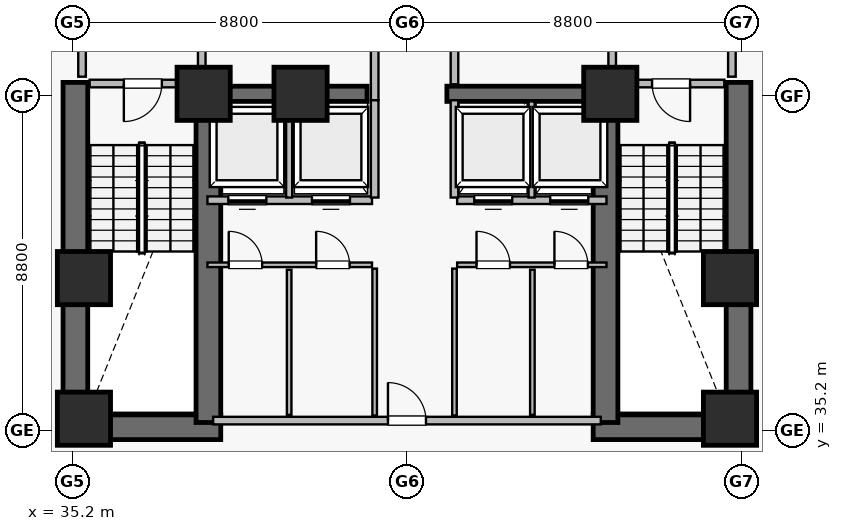
"""IFC4 building model, lengths in metres.
Left out: names, types, materials, properties, quantities, classifications, styles, units other than length and angle.
Written with IfcOpenShell. Run it as: python <this file> out.ifc"""

import sys

from ifc_helpers import new_model, si_unit, direction, frame, frame_2d, origin, origin_2d, place, context, subcontext, project, spatial, rectangle, extrude, element, fill, save


model = new_model("IFC4")
c1 = context("Model", 3, precision=1e-05, world=origin(), true_north=direction((0.0, 1.0)))
c2 = subcontext(c1, "Body", "Model", "MODEL_VIEW")
j1 = project(units=[si_unit("LENGTHUNIT", "METRE"), si_unit("PLANEANGLEUNIT", "RADIAN")], contexts=[c1])
p1 = place(None, origin())
s1 = spatial("IfcSite", under=j1, at=p1, CompositionType="ELEMENT")
p2 = place(p1, origin())
s2 = spatial("IfcBuilding", under=s1, at=p2, CompositionType="ELEMENT")
p3 = place(p2, frame((0.0, 0.0, -7.8)))
s3 = spatial("IfcBuildingStorey", under=s2, at=p3, CompositionType="ELEMENT", Elevation=-7.8)
for number, where, z_axis, x_axis in (
    (1, (34.95, 35.275, 0.0), (0.0, 0.0, 1.0), (1.0, 0.0, 0.0)),
    (2, (48.9, 35.275, 0.0), (0.0, 0.0, 1.0), (1.0, 0.0, 0.0)),
):
    element("IfcWall", number, at=place(p3, frame(where, z_axis=z_axis, x_axis=x_axis)), inside=s3, PredefinedType="SHEAR", context=c2, shape_type="SweptSolid", body=[
        extrude(rectangle(XDim=4.15, YDim=0.65, at=frame_2d((2.075, 0.0))), origin(), (0.0, 0.0, 1.0), 3.58),
    ])
for number, where, z_axis, x_axis in (
    (3, (35.275, 34.95, 0.0), (0.0, 0.0, 1.0), (0.0, 1.0, 0.0)),
    (4, (52.725, 34.95, 0.0), (0.0, 0.0, 1.0), (0.0, 1.0, 0.0)),
):
    element("IfcWall", number, at=place(p3, frame(where, z_axis=z_axis, x_axis=x_axis)), inside=s3, PredefinedType="SHEAR", context=c2, shape_type="SweptSolid", body=[
        extrude(rectangle(XDim=9.4, YDim=0.65, at=frame_2d((4.7, 0.0))), origin(), (0.0, 0.0, 1.0), 3.58),
    ])
for number, where, z_axis, x_axis in (
    (5, (38.775, 35.4, 0.0), (0.0, 0.0, 1.0), (0.0, 1.0, 0.0)),
    (6, (49.225, 35.4, 0.0), (0.0, 0.0, 1.0), (0.0, 1.0, 0.0)),
):
    element("IfcWall", number, at=place(p3, frame(where, z_axis=z_axis, x_axis=x_axis)), inside=s3, PredefinedType="SHEAR", context=c2, shape_type="SweptSolid", body=[
        extrude(rectangle(XDim=8.95, YDim=0.65, at=frame_2d((4.475, 0.0))), origin(), (0.0, 0.0, 1.0), 3.58),
    ])
for number, where, z_axis, x_axis in (
    (7, (38.75, 44.05, 0.0), (0.0, 0.0, 1.0), (1.0, 0.0, 0.0)),
    (8, (45.05, 44.05, 0.0), (0.0, 0.0, 1.0), (1.0, 0.0, 0.0)),
):
    element("IfcWall", number, at=place(p3, frame(where, z_axis=z_axis, x_axis=x_axis)), inside=s3, PredefinedType="SHEAR", context=c2, shape_type="SweptSolid", body=[
        extrude(rectangle(XDim=4.2, YDim=0.4, at=frame_2d((2.1, 0.0))), origin(), (0.0, 0.0, 1.0), 3.58),
    ])
for number, where, z_axis, x_axis in (
    (9, (35.5, 35.5, 0.0), (0.0, 0.0, 1.0), (1.0, 0.0, 0.0)),
    (10, (38.65, 44.05, 0.0), (0.0, 0.0, 1.0), (1.0, 0.0, 0.0)),
    (11, (52.5, 35.5, 0.0), (0.0, 0.0, 1.0), (1.0, 0.0, 0.0)),
    (12, (52.5, 39.2, 0.0), (0.0, 0.0, 1.0), (1.0, 0.0, 0.0)),
    (13, (49.35, 44.05, 0.0), (0.0, 0.0, 1.0), (1.0, 0.0, 0.0)),
    (14, (35.5, 39.2, 0.0), (0.0, 0.0, 1.0), (1.0, 0.0, 0.0)),
    (15, (41.2, 44.05, 0.0), (0.0, 0.0, 1.0), (1.0, 0.0, 0.0)),
):
    element("IfcColumn", number, at=place(p3, frame(where, z_axis=z_axis, x_axis=x_axis)), inside=s3, PredefinedType="COLUMN", context=c2, shape_type="SweptSolid", body=[
        extrude(rectangle(XDim=1.4, YDim=1.4, at=origin_2d()), origin(), (0.0, 0.0, 1.0), 3.9),
    ])
p4 = place(p3, frame((38.9, 35.45, 0.0), z_axis=(0.0, 0.0, 1.0), x_axis=(1.0, 0.0, 0.0)))
e16 = element("IfcWall", 16, at=p4, inside=s3, PredefinedType="SOLIDWALL", context=c2, shape_type="SweptSolid", body=[
    extrude(rectangle(XDim=10.2, YDim=0.2, at=frame_2d((5.1, 0.0))), origin(), (0.0, 0.0, 1.0), 3.58),
])
p5 = place(p4, frame((4.6, 0.0, 0.0)))
e17 = element("IfcOpeningElement", 17, at=p5, cuts=e16, PredefinedType="OPENING", context=c2, shape_type="SweptSolid", body=[
    extrude(rectangle(XDim=1.0, YDim=2.15, at=frame_2d((0.5, 1.075))), frame((0.0, 0.11, 0.0), z_axis=(0.0, -1.0, 0.0), x_axis=(1.0, 0.0, 0.0)), (0.0, 0.0, 1.0), 0.22),
])
p6 = place(p3, frame((35.45, 44.5, 0.0), z_axis=(0.0, 0.0, 1.0), x_axis=(0.0, 1.0, 0.0)))
e18 = element("IfcWall", 18, at=p6, inside=s3, PredefinedType="SOLIDWALL", context=c2, shape_type="SweptSolid", body=[
    extrude(rectangle(XDim=7.92, YDim=0.2, at=frame_2d((3.96, 0.0))), origin(), (0.0, 0.0, 1.0), 3.58),
])
p7 = place(p6, frame((2.6, 0.0, 0.0)))
e19 = element("IfcOpeningElement", 19, at=p7, cuts=e18, PredefinedType="OPENING", context=c2, shape_type="SweptSolid", body=[
    extrude(rectangle(XDim=1.0, YDim=2.15, at=frame_2d((0.5, 1.075))), frame((0.0, 0.11, 0.0), z_axis=(0.0, -1.0, 0.0), x_axis=(1.0, 0.0, 0.0)), (0.0, 0.0, 1.0), 0.22),
])
p8 = place(p3, frame((52.55, 44.5, 0.0), z_axis=(0.0, 0.0, 1.0), x_axis=(0.0, 1.0, 0.0)))
e20 = element("IfcWall", 20, at=p8, inside=s3, PredefinedType="SOLIDWALL", context=c2, shape_type="SweptSolid", body=[
    extrude(rectangle(XDim=7.92, YDim=0.2, at=frame_2d((3.96, 0.0))), origin(), (0.0, 0.0, 1.0), 3.58),
])
p9 = place(p8, frame((2.6, 0.0, 0.0)))
e21 = element("IfcOpeningElement", 21, at=p9, cuts=e20, PredefinedType="OPENING", context=c2, shape_type="SweptSolid", body=[
    extrude(rectangle(XDim=1.0, YDim=2.15, at=frame_2d((0.5, 1.075))), frame((0.0, 0.11, 0.0), z_axis=(0.0, -1.0, 0.0), x_axis=(1.0, 0.0, 0.0)), (0.0, 0.0, 1.0), 0.22),
])
p10 = place(p3, frame((38.6, 44.5, 0.0), z_axis=(0.0, 0.0, 1.0), x_axis=(0.0, 1.0, 0.0)))
e22 = element("IfcWall", 22, at=p10, inside=s3, PredefinedType="SOLIDWALL", context=c2, shape_type="SweptSolid", body=[
    extrude(rectangle(XDim=7.92, YDim=0.2, at=frame_2d((3.96, 0.0))), origin(), (0.0, 0.0, 1.0), 3.58),
])
p11 = place(p10, frame((3.425, 0.0, 0.0)))
e23 = element("IfcOpeningElement", 23, at=p11, cuts=e22, PredefinedType="OPENING", context=c2, shape_type="SweptSolid", body=[
    extrude(rectangle(XDim=0.95, YDim=2.15, at=frame_2d((0.475, 1.075))), frame((0.0, 0.11, 0.0), z_axis=(0.0, -1.0, 0.0), x_axis=(1.0, 0.0, 0.0)), (0.0, 0.0, 1.0), 0.22),
])
p12 = place(p3, frame((49.4, 44.5, 0.0), z_axis=(0.0, 0.0, 1.0), x_axis=(0.0, 1.0, 0.0)))
e24 = element("IfcWall", 24, at=p12, inside=s3, PredefinedType="SOLIDWALL", context=c2, shape_type="SweptSolid", body=[
    extrude(rectangle(XDim=7.92, YDim=0.2, at=frame_2d((3.96, 0.0))), origin(), (0.0, 0.0, 1.0), 3.58),
])
p13 = place(p12, frame((3.425, 0.0, 0.0)))
e25 = element("IfcOpeningElement", 25, at=p13, cuts=e24, PredefinedType="OPENING", context=c2, shape_type="SweptSolid", body=[
    extrude(rectangle(XDim=0.95, YDim=2.15, at=frame_2d((0.475, 1.075))), frame((0.0, 0.11, 0.0), z_axis=(0.0, -1.0, 0.0), x_axis=(1.0, 0.0, 0.0)), (0.0, 0.0, 1.0), 0.22),
])
p14 = place(p3, frame((38.75, 41.25, 0.0), z_axis=(0.0, 0.0, 1.0), x_axis=(1.0, 0.0, 0.0)))
e26 = element("IfcWall", 26, at=p14, inside=s3, PredefinedType="SOLIDWALL", context=c2, shape_type="SweptSolid", body=[
    extrude(rectangle(XDim=4.33, YDim=0.2, at=frame_2d((2.165, 0.0))), origin(), (0.0, 0.0, 1.0), 3.58),
])
p15 = place(p14, frame((0.55, 0.0, 0.0)))
e27 = element("IfcOpeningElement", 27, at=p15, cuts=e26, PredefinedType="OPENING", context=c2, shape_type="SweptSolid", body=[
    extrude(rectangle(XDim=1.0, YDim=2.15, at=frame_2d((0.5, 1.075))), frame((0.0, 0.11, 0.0), z_axis=(0.0, -1.0, 0.0), x_axis=(1.0, 0.0, 0.0)), (0.0, 0.0, 1.0), 0.22),
])
p16 = place(p14, frame((2.75, 0.0, 0.0)))
e28 = element("IfcOpeningElement", 28, at=p16, cuts=e26, PredefinedType="OPENING", context=c2, shape_type="SweptSolid", body=[
    extrude(rectangle(XDim=1.0, YDim=2.15, at=frame_2d((0.5, 1.075))), frame((0.0, 0.11, 0.0), z_axis=(0.0, -1.0, 0.0), x_axis=(1.0, 0.0, 0.0)), (0.0, 0.0, 1.0), 0.22),
])
p17 = place(p3, frame((38.75, 39.55, 0.0), z_axis=(0.0, 0.0, 1.0), x_axis=(1.0, 0.0, 0.0)))
e29 = element("IfcWall", 29, at=p17, inside=s3, PredefinedType="PARTITIONING", context=c2, shape_type="SweptSolid", body=[
    extrude(rectangle(XDim=4.33, YDim=0.12, at=frame_2d((2.165, 0.0))), origin(), (0.0, 0.0, 1.0), 3.58),
])
p18 = place(p17, frame((0.56, 0.0, 0.0)))
e30 = element("IfcOpeningElement", 30, at=p18, cuts=e29, PredefinedType="OPENING", context=c2, shape_type="SweptSolid", body=[
    extrude(rectangle(XDim=0.88, YDim=2.1, at=frame_2d((0.44, 1.05))), frame((0.0, 0.07, 0.0), z_axis=(0.0, -1.0, 0.0), x_axis=(1.0, 0.0, 0.0)), (0.0, 0.0, 1.0), 0.14),
])
p19 = place(p17, frame((2.86, 0.0, 0.0)))
e31 = element("IfcOpeningElement", 31, at=p19, cuts=e29, PredefinedType="OPENING", context=c2, shape_type="SweptSolid", body=[
    extrude(rectangle(XDim=0.88, YDim=2.1, at=frame_2d((0.44, 1.05))), frame((0.0, 0.07, 0.0), z_axis=(0.0, -1.0, 0.0), x_axis=(1.0, 0.0, 0.0)), (0.0, 0.0, 1.0), 0.14),
])
p20 = place(p3, frame((45.32, 41.25, 0.0), z_axis=(0.0, 0.0, 1.0), x_axis=(1.0, 0.0, 0.0)))
e32 = element("IfcWall", 32, at=p20, inside=s3, PredefinedType="SOLIDWALL", context=c2, shape_type="SweptSolid", body=[
    extrude(rectangle(XDim=3.93, YDim=0.2, at=frame_2d((1.965, 0.0))), origin(), (0.0, 0.0, 1.0), 3.58),
])
p21 = place(p20, frame((0.45, 0.0, 0.0)))
e33 = element("IfcOpeningElement", 33, at=p21, cuts=e32, PredefinedType="OPENING", context=c2, shape_type="SweptSolid", body=[
    extrude(rectangle(XDim=1.0, YDim=2.15, at=frame_2d((0.5, 1.075))), frame((0.0, 0.11, 0.0), z_axis=(0.0, -1.0, 0.0), x_axis=(1.0, 0.0, 0.0)), (0.0, 0.0, 1.0), 0.22),
])
p22 = place(p20, frame((2.45, 0.0, 0.0)))
e34 = element("IfcOpeningElement", 34, at=p22, cuts=e32, PredefinedType="OPENING", context=c2, shape_type="SweptSolid", body=[
    extrude(rectangle(XDim=1.0, YDim=2.15, at=frame_2d((0.5, 1.075))), frame((0.0, 0.11, 0.0), z_axis=(0.0, -1.0, 0.0), x_axis=(1.0, 0.0, 0.0)), (0.0, 0.0, 1.0), 0.22),
])
p23 = place(p3, frame((45.32, 39.55, 0.0), z_axis=(0.0, 0.0, 1.0), x_axis=(1.0, 0.0, 0.0)))
e35 = element("IfcWall", 35, at=p23, inside=s3, PredefinedType="PARTITIONING", context=c2, shape_type="SweptSolid", body=[
    extrude(rectangle(XDim=3.93, YDim=0.12, at=frame_2d((1.965, 0.0))), origin(), (0.0, 0.0, 1.0), 3.58),
])
p24 = place(p23, frame((0.51, 0.0, 0.0)))
e36 = element("IfcOpeningElement", 36, at=p24, cuts=e35, PredefinedType="OPENING", context=c2, shape_type="SweptSolid", body=[
    extrude(rectangle(XDim=0.88, YDim=2.1, at=frame_2d((0.44, 1.05))), frame((0.0, 0.07, 0.0), z_axis=(0.0, -1.0, 0.0), x_axis=(1.0, 0.0, 0.0)), (0.0, 0.0, 1.0), 0.14),
])
p25 = place(p23, frame((2.56, 0.0, 0.0)))
e37 = element("IfcOpeningElement", 37, at=p25, cuts=e35, PredefinedType="OPENING", context=c2, shape_type="SweptSolid", body=[
    extrude(rectangle(XDim=0.88, YDim=2.1, at=frame_2d((0.44, 1.05))), frame((0.0, 0.07, 0.0), z_axis=(0.0, -1.0, 0.0), x_axis=(1.0, 0.0, 0.0)), (0.0, 0.0, 1.0), 0.14),
])
p26 = place(p3, frame((35.65, 44.32, 0.0), z_axis=(0.0, 0.0, 1.0), x_axis=(1.0, 0.0, 0.0)))
e38 = element("IfcWall", 38, at=p26, inside=s3, PredefinedType="SOLIDWALL", context=c2, shape_type="SweptSolid", body=[
    extrude(rectangle(XDim=2.8, YDim=0.2, at=frame_2d((1.4, 0.0))), origin(), (0.0, 0.0, 1.0), 3.58),
])
p27 = place(p26, frame((0.9, 0.0, 0.0)))
e39 = element("IfcOpeningElement", 39, at=p27, cuts=e38, PredefinedType="OPENING", context=c2, shape_type="SweptSolid", body=[
    extrude(rectangle(XDim=1.0, YDim=2.15, at=frame_2d((0.5, 1.075))), frame((0.0, 0.11, 0.0), z_axis=(0.0, -1.0, 0.0), x_axis=(1.0, 0.0, 0.0)), (0.0, 0.0, 1.0), 0.22),
])
p28 = place(p3, frame((49.55, 44.32, 0.0), z_axis=(0.0, 0.0, 1.0), x_axis=(1.0, 0.0, 0.0)))
e40 = element("IfcWall", 40, at=p28, inside=s3, PredefinedType="SOLIDWALL", context=c2, shape_type="SweptSolid", body=[
    extrude(rectangle(XDim=2.8, YDim=0.2, at=frame_2d((1.4, 0.0))), origin(), (0.0, 0.0, 1.0), 3.58),
])
p29 = place(p28, frame((0.9, 0.0, 0.0)))
e41 = element("IfcOpeningElement", 41, at=p29, cuts=e40, PredefinedType="OPENING", context=c2, shape_type="SweptSolid", body=[
    extrude(rectangle(XDim=1.0, YDim=2.15, at=frame_2d((0.5, 1.075))), frame((0.0, 0.11, 0.0), z_axis=(0.0, -1.0, 0.0), x_axis=(1.0, 0.0, 0.0)), (0.0, 0.0, 1.0), 0.22),
])
for number, where, z_axis, x_axis in (
    (42, (43.15, 35.58, 0.0), (0.0, 0.0, 1.0), (0.0, 1.0, 0.0)),
    (43, (45.25, 35.58, 0.0), (0.0, 0.0, 1.0), (0.0, 1.0, 0.0)),
):
    element("IfcWall", number, at=place(p3, frame(where, z_axis=z_axis, x_axis=x_axis)), inside=s3, PredefinedType="PARTITIONING", context=c2, shape_type="SweptSolid", body=[
        extrude(rectangle(XDim=3.87, YDim=0.12, at=frame_2d((1.935, 0.0))), origin(), (0.0, 0.0, 1.0), 3.58),
    ])
for number, where, z_axis, x_axis in (
    (44, (40.9, 35.6, 0.0), (0.0, 0.0, 1.0), (0.0, 1.0, 0.0)),
    (45, (47.3, 35.6, 0.0), (0.0, 0.0, 1.0), (0.0, 1.0, 0.0)),
):
    element("IfcWall", number, at=place(p3, frame(where, z_axis=z_axis, x_axis=x_axis)), inside=s3, PredefinedType="PARTITIONING", context=c2, shape_type="SweptSolid", body=[
        extrude(rectangle(XDim=3.82, YDim=0.12, at=frame_2d((1.91, 0.0))), origin(), (0.0, 0.0, 1.0), 3.58),
    ])
p30 = place(p3, frame((43.15, 43.88, 0.0), z_axis=(0.0, 0.0, 1.0), x_axis=(0.0, 1.0, 0.0)))
e46 = element("IfcWall", 46, at=p30, inside=s3, PredefinedType="SOLIDWALL", context=c2, shape_type="SweptSolid", body=[
    extrude(rectangle(XDim=3.0, YDim=0.2, at=frame_2d((1.5, 0.0))), origin(), (0.0, 0.0, 1.0), 3.58),
])
p31 = place(p3, frame((45.25, 44.3, 0.0), z_axis=(0.0, 0.0, 1.0), x_axis=(0.0, 1.0, 0.0)))
e47 = element("IfcWall", 47, at=p31, inside=s3, PredefinedType="SOLIDWALL", context=c2, shape_type="SweptSolid", body=[
    extrude(rectangle(XDim=2.58, YDim=0.2, at=frame_2d((1.29, 0.0))), origin(), (0.0, 0.0, 1.0), 3.58),
])
for number, where, z_axis, x_axis in (
    (48, (43.15, 41.32, 0.0), (0.0, 0.0, 1.0), (0.0, 1.0, 0.0)),
    (49, (45.25, 41.32, 0.0), (0.0, 0.0, 1.0), (0.0, 1.0, 0.0)),
):
    element("IfcWall", number, at=place(p3, frame(where, z_axis=z_axis, x_axis=x_axis)), inside=s3, PredefinedType="SOLIDWALL", context=c2, shape_type="SweptSolid", body=[
        extrude(rectangle(XDim=2.56, YDim=0.2, at=frame_2d((1.28, 0.0))), origin(), (0.0, 0.0, 1.0), 3.58),
    ])
for number, where, z_axis, x_axis in (
    (50, (40.9, 41.32, 0.0), (0.0, 0.0, 1.0), (0.0, 1.0, 0.0)),
    (51, (47.28, 41.32, 0.0), (0.0, 0.0, 1.0), (0.0, 1.0, 0.0)),
):
    element("IfcWall", number, at=place(p3, frame(where, z_axis=z_axis, x_axis=x_axis)), inside=s3, PredefinedType="SOLIDWALL", context=c2, shape_type="SweptSolid", body=[
        extrude(rectangle(XDim=2.53, YDim=0.16, at=frame_2d((1.265, 0.0))), origin(), (0.0, 0.0, 1.0), 3.58),
    ])
p32 = place(p27, frame((1.0, 0.0, 0.0), z_axis=(0.0, 0.0, 1.0), x_axis=(-1.0, 0.0, 0.0)))
e52 = element("IfcDoor", 52, at=p32, inside=s3, OperationType="SINGLE_SWING_LEFT", PredefinedType="DOOR", context=c2, shape_type="SweptSolid", body=[
    extrude(rectangle(XDim=1.0, YDim=2.15, at=frame_2d((0.5, 1.075))), frame((0.0, 0.025, 0.0), z_axis=(0.0, -1.0, 0.0), x_axis=(1.0, 0.0, 0.0)), (0.0, 0.0, 1.0), 0.05),
])
fill(e39, e52)
p33 = place(p29, frame((1.0, 0.0, 0.0), z_axis=(0.0, 0.0, 1.0), x_axis=(-1.0, 0.0, 0.0)))
e53 = element("IfcDoor", 53, at=p33, inside=s3, OperationType="SINGLE_SWING_RIGHT", PredefinedType="DOOR", context=c2, shape_type="SweptSolid", body=[
    extrude(rectangle(XDim=1.0, YDim=2.15, at=frame_2d((0.5, 1.075))), frame((0.0, 0.025, 0.0), z_axis=(0.0, -1.0, 0.0), x_axis=(1.0, 0.0, 0.0)), (0.0, 0.0, 1.0), 0.05),
])
fill(e41, e53)
p34 = place(p5, origin())
e54 = element("IfcDoor", 54, at=p34, inside=s3, OperationType="SINGLE_SWING_LEFT", PredefinedType="DOOR", context=c2, shape_type="SweptSolid", body=[
    extrude(rectangle(XDim=1.0, YDim=2.15, at=frame_2d((0.5, 1.075))), frame((0.0, 0.025, 0.0), z_axis=(0.0, -1.0, 0.0), x_axis=(1.0, 0.0, 0.0)), (0.0, 0.0, 1.0), 0.05),
])
fill(e17, e54)
p35 = place(p15, frame((1.0, 0.0, 0.0), z_axis=(0.0, 0.0, 1.0), x_axis=(-1.0, 0.0, 0.0)))
e55 = element("IfcDoor", 55, at=p35, inside=s3, OperationType="SLIDING_TO_LEFT", PredefinedType="DOOR", context=c2, shape_type="SweptSolid", body=[
    extrude(rectangle(XDim=1.0, YDim=2.15, at=frame_2d((0.5, 1.075))), frame((0.0, 0.025, 0.0), z_axis=(0.0, -1.0, 0.0), x_axis=(1.0, 0.0, 0.0)), (0.0, 0.0, 1.0), 0.05),
])
fill(e27, e55)
p36 = place(p16, frame((1.0, 0.0, 0.0), z_axis=(0.0, 0.0, 1.0), x_axis=(-1.0, 0.0, 0.0)))
e56 = element("IfcDoor", 56, at=p36, inside=s3, OperationType="SLIDING_TO_LEFT", PredefinedType="DOOR", context=c2, shape_type="SweptSolid", body=[
    extrude(rectangle(XDim=1.0, YDim=2.15, at=frame_2d((0.5, 1.075))), frame((0.0, 0.025, 0.0), z_axis=(0.0, -1.0, 0.0), x_axis=(1.0, 0.0, 0.0)), (0.0, 0.0, 1.0), 0.05),
])
fill(e28, e56)
p37 = place(p21, frame((1.0, 0.0, 0.0), z_axis=(0.0, 0.0, 1.0), x_axis=(-1.0, 0.0, 0.0)))
e57 = element("IfcDoor", 57, at=p37, inside=s3, OperationType="SLIDING_TO_LEFT", PredefinedType="DOOR", context=c2, shape_type="SweptSolid", body=[
    extrude(rectangle(XDim=1.0, YDim=2.15, at=frame_2d((0.5, 1.075))), frame((0.0, 0.025, 0.0), z_axis=(0.0, -1.0, 0.0), x_axis=(1.0, 0.0, 0.0)), (0.0, 0.0, 1.0), 0.05),
])
fill(e33, e57)
p38 = place(p22, frame((1.0, 0.0, 0.0), z_axis=(0.0, 0.0, 1.0), x_axis=(-1.0, 0.0, 0.0)))
e58 = element("IfcDoor", 58, at=p38, inside=s3, OperationType="SLIDING_TO_LEFT", PredefinedType="DOOR", context=c2, shape_type="SweptSolid", body=[
    extrude(rectangle(XDim=1.0, YDim=2.15, at=frame_2d((0.5, 1.075))), frame((0.0, 0.025, 0.0), z_axis=(0.0, -1.0, 0.0), x_axis=(1.0, 0.0, 0.0)), (0.0, 0.0, 1.0), 0.05),
])
fill(e34, e58)
p39 = place(p18, origin())
e59 = element("IfcDoor", 59, at=p39, inside=s3, OperationType="SINGLE_SWING_LEFT", PredefinedType="DOOR", context=c2, shape_type="SweptSolid", body=[
    extrude(rectangle(XDim=0.88, YDim=2.1, at=frame_2d((0.44, 1.05))), frame((0.0, 0.025, 0.0), z_axis=(0.0, -1.0, 0.0), x_axis=(1.0, 0.0, 0.0)), (0.0, 0.0, 1.0), 0.05),
])
fill(e30, e59)
p40 = place(p19, origin())
e60 = element("IfcDoor", 60, at=p40, inside=s3, OperationType="SINGLE_SWING_LEFT", PredefinedType="DOOR", context=c2, shape_type="SweptSolid", body=[
    extrude(rectangle(XDim=0.88, YDim=2.1, at=frame_2d((0.44, 1.05))), frame((0.0, 0.025, 0.0), z_axis=(0.0, -1.0, 0.0), x_axis=(1.0, 0.0, 0.0)), (0.0, 0.0, 1.0), 0.05),
])
fill(e31, e60)
p41 = place(p24, origin())
e61 = element("IfcDoor", 61, at=p41, inside=s3, OperationType="SINGLE_SWING_LEFT", PredefinedType="DOOR", context=c2, shape_type="SweptSolid", body=[
    extrude(rectangle(XDim=0.88, YDim=2.1, at=frame_2d((0.44, 1.05))), frame((0.0, 0.025, 0.0), z_axis=(0.0, -1.0, 0.0), x_axis=(1.0, 0.0, 0.0)), (0.0, 0.0, 1.0), 0.05),
])
fill(e36, e61)
p42 = place(p25, origin())
e62 = element("IfcDoor", 62, at=p42, inside=s3, OperationType="SINGLE_SWING_LEFT", PredefinedType="DOOR", context=c2, shape_type="SweptSolid", body=[
    extrude(rectangle(XDim=0.88, YDim=2.1, at=frame_2d((0.44, 1.05))), frame((0.0, 0.025, 0.0), z_axis=(0.0, -1.0, 0.0), x_axis=(1.0, 0.0, 0.0)), (0.0, 0.0, 1.0), 0.05),
])
fill(e37, e62)
save(model, sys.argv[1])
